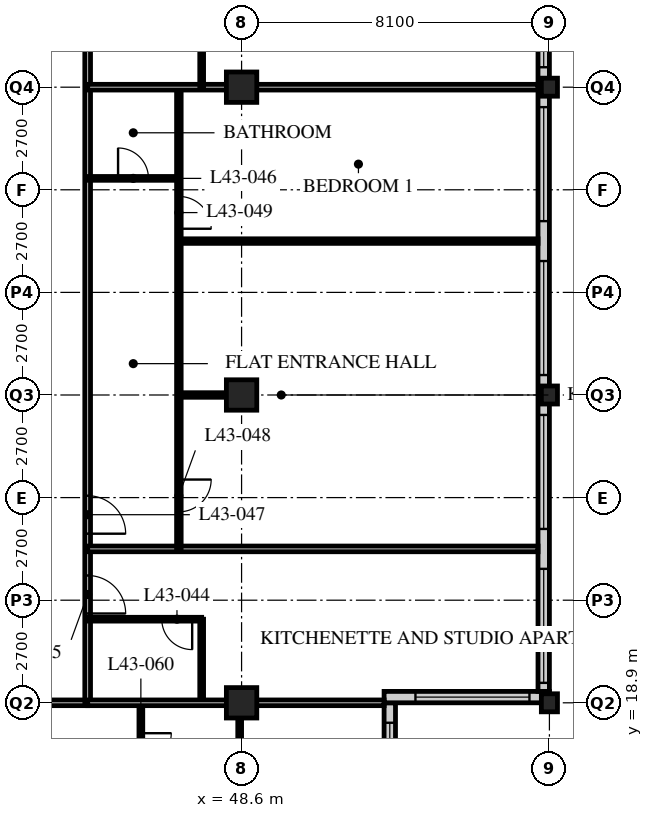
"""IFC4 building model, lengths in metres.
Left out: names, types, materials, properties, quantities, classifications, styles, units other than length and angle.
Written with IfcOpenShell. Run it as: python <this file> out.ifc"""

import sys

from ifc_helpers import new_model, si_unit, direction, frame, frame_2d, origin, origin_2d, place, context, subcontext, project, spatial, rectangle, hollow_rectangle, i_section, extrude, element, fill, save


model = new_model("IFC4")
c1 = context("Model", 3, precision=1e-05, world=origin(), true_north=direction((0.0, 1.0)))
c2 = subcontext(c1, "Body", "Model", "MODEL_VIEW")
j1 = project(units=[si_unit("LENGTHUNIT", "METRE"), si_unit("PLANEANGLEUNIT", "RADIAN")], contexts=[c1])
p1 = place(None, origin())
s1 = spatial("IfcSite", under=j1, at=p1, CompositionType="ELEMENT")
p2 = place(p1, origin())
s2 = spatial("IfcBuilding", under=s1, at=p2, CompositionType="ELEMENT")
p3 = place(p2, frame((0.0, 0.0, 170.4)))
s3 = spatial("IfcBuildingStorey", under=s2, at=p3, CompositionType="ELEMENT", Elevation=170.4)
for number, where, z_axis, x_axis in (
    (1, (48.6, 18.9, 0.0), (0.0, 0.0, 1.0), (1.0, 0.0, 0.0)),
    (2, (48.6, 27.0, 0.0), (0.0, 0.0, 1.0), (1.0, 0.0, 0.0)),
    (3, (48.6, 35.1, 0.0), (0.0, 0.0, 1.0), (1.0, 0.0, 0.0)),
):
    element("IfcColumn", number, at=place(p3, frame(where, z_axis=z_axis, x_axis=x_axis)), inside=s3, PredefinedType="COLUMN", context=c2, shape_type="SweptSolid", body=[
        extrude(hollow_rectangle(XDim=0.8, YDim=0.8, WallThickness=0.08, at=origin_2d()), origin(), (0.0, 0.0, 1.0), 3.6),
    ])
for number, where, z_axis, x_axis in (
    (4, (56.7, 18.9, 0.0), (0.0, 0.0, 1.0), (1.0, 0.0, 0.0)),
    (5, (56.7, 27.0, 0.0), (0.0, 0.0, 1.0), (1.0, 0.0, 0.0)),
    (6, (56.7, 35.1, 0.0), (0.0, 0.0, 1.0), (1.0, 0.0, 0.0)),
):
    element("IfcColumn", number, at=place(p3, frame(where, z_axis=z_axis, x_axis=x_axis)), inside=s3, PredefinedType="COLUMN", context=c2, shape_type="SweptSolid", body=[
        extrude(i_section(OverallWidth=0.424, OverallDepth=0.475, WebThickness=0.048, FlangeThickness=0.077, FilletRadius=0.015, at=origin_2d()), origin(), (0.0, 0.0, 1.0), 3.6),
    ])
p4 = place(p3, frame((52.5, 15.15, 0.0), z_axis=(0.0, 0.0, 1.0), x_axis=(0.0, 1.0, 0.0)))
e7 = element("IfcWall", 7, at=p4, inside=s3, PredefinedType="SOLIDWALL", context=c2, shape_type="SweptSolid", body=[
    extrude(rectangle(XDim=3.75, YDim=0.3, at=frame_2d((1.875, 0.0))), origin(), (0.0, 0.0, 1.0), 3.39),
])
p5 = place(p4, frame((0.225, 0.0, 0.6)))
e8 = element("IfcOpeningElement", 8, at=p5, cuts=e7, PredefinedType="OPENING", context=c2, shape_type="SweptSolid", body=[
    extrude(rectangle(XDim=3.0, YDim=2.0, at=frame_2d((1.5, 1.0))), frame((0.0, 0.16, 0.0), z_axis=(0.0, -1.0, 0.0), x_axis=(1.0, 0.0, 0.0)), (0.0, 0.0, 1.0), 0.32),
])
p6 = place(p3, frame((52.35, 19.05, 0.0), z_axis=(0.0, 0.0, 1.0), x_axis=(1.0, 0.0, 0.0)))
e9 = element("IfcWall", 9, at=p6, inside=s3, PredefinedType="SOLIDWALL", context=c2, shape_type="SweptSolid", body=[
    extrude(rectangle(XDim=4.35, YDim=0.3, at=frame_2d((2.175, 0.0))), origin(), (0.0, 0.0, 1.0), 3.39),
])
p7 = place(p6, frame((0.825, 0.0, 0.6)))
e10 = element("IfcOpeningElement", 10, at=p7, cuts=e9, PredefinedType="OPENING", context=c2, shape_type="SweptSolid", body=[
    extrude(rectangle(XDim=3.0, YDim=2.0, at=frame_2d((1.5, 1.0))), frame((0.0, 0.16, 0.0), z_axis=(0.0, -1.0, 0.0), x_axis=(1.0, 0.0, 0.0)), (0.0, 0.0, 1.0), 0.32),
])
p8 = place(p3, frame((56.55, 19.2, 0.0), z_axis=(0.0, 0.0, 1.0), x_axis=(0.0, 1.0, 0.0)))
e11 = element("IfcWall", 11, at=p8, inside=s3, PredefinedType="SOLIDWALL", context=c2, shape_type="SweptSolid", body=[
    extrude(rectangle(XDim=32.1, YDim=0.3, at=frame_2d((16.05, 0.0))), origin(), (0.0, 0.0, 1.0), 3.39),
])
p9 = place(p8, frame((0.225, 0.0, 0.6)))
e12 = element("IfcOpeningElement", 12, at=p9, cuts=e11, PredefinedType="OPENING", context=c2, shape_type="SweptSolid", body=[
    extrude(rectangle(XDim=3.0, YDim=2.4, at=frame_2d((1.5, 1.2))), frame((0.0, 0.16, 0.0), z_axis=(0.0, -1.0, 0.0), x_axis=(1.0, 0.0, 0.0)), (0.0, 0.0, 1.0), 0.32),
])
p10 = place(p8, frame((4.275, 0.0, 0.6)))
e13 = element("IfcOpeningElement", 13, at=p10, cuts=e11, PredefinedType="OPENING", context=c2, shape_type="SweptSolid", body=[
    extrude(rectangle(XDim=3.0, YDim=2.4, at=frame_2d((1.5, 1.2))), frame((0.0, 0.16, 0.0), z_axis=(0.0, -1.0, 0.0), x_axis=(1.0, 0.0, 0.0)), (0.0, 0.0, 1.0), 0.32),
])
p11 = place(p8, frame((8.325, 0.0, 0.6)))
e14 = element("IfcOpeningElement", 14, at=p11, cuts=e11, PredefinedType="OPENING", context=c2, shape_type="SweptSolid", body=[
    extrude(rectangle(XDim=3.0, YDim=2.4, at=frame_2d((1.5, 1.2))), frame((0.0, 0.16, 0.0), z_axis=(0.0, -1.0, 0.0), x_axis=(1.0, 0.0, 0.0)), (0.0, 0.0, 1.0), 0.32),
])
p12 = place(p8, frame((12.375, 0.0, 0.6)))
e15 = element("IfcOpeningElement", 15, at=p12, cuts=e11, PredefinedType="OPENING", context=c2, shape_type="SweptSolid", body=[
    extrude(rectangle(XDim=3.0, YDim=2.4, at=frame_2d((1.5, 1.2))), frame((0.0, 0.16, 0.0), z_axis=(0.0, -1.0, 0.0), x_axis=(1.0, 0.0, 0.0)), (0.0, 0.0, 1.0), 0.32),
])
p13 = place(p8, frame((16.425, 0.0, 0.6)))
e16 = element("IfcOpeningElement", 16, at=p13, cuts=e11, PredefinedType="OPENING", context=c2, shape_type="SweptSolid", body=[
    extrude(rectangle(XDim=3.0, YDim=2.4, at=frame_2d((1.5, 1.2))), frame((0.0, 0.16, 0.0), z_axis=(0.0, -1.0, 0.0), x_axis=(1.0, 0.0, 0.0)), (0.0, 0.0, 1.0), 0.32),
])
p14 = place(p8, frame((20.475, 0.0, 0.6)))
e17 = element("IfcOpeningElement", 17, at=p14, cuts=e11, PredefinedType="OPENING", context=c2, shape_type="SweptSolid", body=[
    extrude(rectangle(XDim=3.0, YDim=2.4, at=frame_2d((1.5, 1.2))), frame((0.0, 0.16, 0.0), z_axis=(0.0, -1.0, 0.0), x_axis=(1.0, 0.0, 0.0)), (0.0, 0.0, 1.0), 0.32),
])
p15 = place(p8, frame((24.525, 0.0, 0.6)))
e18 = element("IfcOpeningElement", 18, at=p15, cuts=e11, PredefinedType="OPENING", context=c2, shape_type="SweptSolid", body=[
    extrude(rectangle(XDim=3.0, YDim=2.4, at=frame_2d((1.5, 1.2))), frame((0.0, 0.16, 0.0), z_axis=(0.0, -1.0, 0.0), x_axis=(1.0, 0.0, 0.0)), (0.0, 0.0, 1.0), 0.32),
])
p16 = place(p8, frame((28.575, 0.0, 0.6)))
e19 = element("IfcOpeningElement", 19, at=p16, cuts=e11, PredefinedType="OPENING", context=c2, shape_type="SweptSolid", body=[
    extrude(rectangle(XDim=3.0, YDim=2.4, at=frame_2d((1.5, 1.2))), frame((0.0, 0.16, 0.0), z_axis=(0.0, -1.0, 0.0), x_axis=(1.0, 0.0, 0.0)), (0.0, 0.0, 1.0), 0.32),
])
p17 = place(p3, frame((12.15, 18.9, 0.0), z_axis=(0.0, 0.0, 1.0), x_axis=(1.0, 0.0, 0.0)))
e20 = element("IfcWall", 20, at=p17, inside=s3, PredefinedType="PARTITIONING", context=c2, shape_type="SweptSolid", body=[
    extrude(rectangle(XDim=32.4, YDim=0.15, at=frame_2d((16.2, 0.0))), origin(), (0.0, 0.0, 1.0), 2.778),
])
p18 = place(p17, frame((6.4, 0.0, 0.0)))
e21 = element("IfcOpeningElement", 21, at=p18, cuts=e20, PredefinedType="OPENING", context=c2, shape_type="SweptSolid", body=[
    extrude(rectangle(XDim=1.0, YDim=2.1, at=frame_2d((0.5, 1.05))), frame((0.0, 0.085, 0.0), z_axis=(0.0, -1.0, 0.0), x_axis=(1.0, 0.0, 0.0)), (0.0, 0.0, 1.0), 0.17),
])
p19 = place(p17, frame((8.8, 0.0, 0.0)))
e22 = element("IfcOpeningElement", 22, at=p19, cuts=e20, PredefinedType="OPENING", context=c2, shape_type="SweptSolid", body=[
    extrude(rectangle(XDim=1.0, YDim=2.1, at=frame_2d((0.5, 1.05))), frame((0.0, 0.085, 0.0), z_axis=(0.0, -1.0, 0.0), x_axis=(1.0, 0.0, 0.0)), (0.0, 0.0, 1.0), 0.17),
])
p20 = place(p17, frame((13.05, 0.0, 0.0)))
e23 = element("IfcOpeningElement", 23, at=p20, cuts=e20, PredefinedType="OPENING", context=c2, shape_type="SweptSolid", body=[
    extrude(rectangle(XDim=1.0, YDim=2.1, at=frame_2d((0.5, 1.05))), frame((0.0, 0.085, 0.0), z_axis=(0.0, -1.0, 0.0), x_axis=(1.0, 0.0, 0.0)), (0.0, 0.0, 1.0), 0.17),
])
p21 = place(p17, frame((22.6, 0.0, 0.0)))
e24 = element("IfcOpeningElement", 24, at=p21, cuts=e20, PredefinedType="OPENING", context=c2, shape_type="SweptSolid", body=[
    extrude(rectangle(XDim=1.0, YDim=2.1, at=frame_2d((0.5, 1.05))), frame((0.0, 0.085, 0.0), z_axis=(0.0, -1.0, 0.0), x_axis=(1.0, 0.0, 0.0)), (0.0, 0.0, 1.0), 0.17),
])
p22 = place(p17, frame((25.0, 0.0, 0.0)))
e25 = element("IfcOpeningElement", 25, at=p22, cuts=e20, PredefinedType="OPENING", context=c2, shape_type="SweptSolid", body=[
    extrude(rectangle(XDim=1.0, YDim=2.1, at=frame_2d((0.5, 1.05))), frame((0.0, 0.085, 0.0), z_axis=(0.0, -1.0, 0.0), x_axis=(1.0, 0.0, 0.0)), (0.0, 0.0, 1.0), 0.17),
])
p23 = place(p17, frame((1.525, 0.0, 0.0)))
e26 = element("IfcOpeningElement", 26, at=p23, cuts=e20, PredefinedType="OPENING", context=c2, shape_type="SweptSolid", body=[
    extrude(rectangle(XDim=1.0, YDim=2.1, at=frame_2d((0.5, 1.05))), frame((0.0, 0.085, 0.0), z_axis=(0.0, -1.0, 0.0), x_axis=(1.0, 0.0, 0.0)), (0.0, 0.0, 1.0), 0.17),
])
p24 = place(p17, frame((29.875, 0.0, 0.0)))
e27 = element("IfcOpeningElement", 27, at=p24, cuts=e20, PredefinedType="OPENING", context=c2, shape_type="SweptSolid", body=[
    extrude(rectangle(XDim=1.0, YDim=2.1, at=frame_2d((0.5, 1.05))), frame((0.0, 0.085, 0.0), z_axis=(0.0, -1.0, 0.0), x_axis=(1.0, 0.0, 0.0)), (0.0, 0.0, 1.0), 0.17),
])
p25 = place(p3, frame((44.55, 18.9, 0.0), z_axis=(0.0, 0.0, 1.0), x_axis=(0.0, 1.0, 0.0)))
e28 = element("IfcWall", 28, at=p25, inside=s3, PredefinedType="PARTITIONING", context=c2, shape_type="SweptSolid", body=[
    extrude(rectangle(XDim=24.3, YDim=0.15, at=frame_2d((12.15, 0.0))), origin(), (0.0, 0.0, 1.0), 3.39),
])
p26 = place(p25, frame((2.35, 0.0, 0.0)))
e29 = element("IfcOpeningElement", 29, at=p26, cuts=e28, PredefinedType="OPENING", context=c2, shape_type="SweptSolid", body=[
    extrude(rectangle(XDim=1.0, YDim=2.1, at=frame_2d((0.5, 1.05))), frame((0.0, 0.085, 0.0), z_axis=(0.0, -1.0, 0.0), x_axis=(1.0, 0.0, 0.0)), (0.0, 0.0, 1.0), 0.17),
])
p27 = place(p25, frame((4.45, 0.0, 0.0)))
e30 = element("IfcOpeningElement", 30, at=p27, cuts=e28, PredefinedType="OPENING", context=c2, shape_type="SweptSolid", body=[
    extrude(rectangle(XDim=1.0, YDim=2.1, at=frame_2d((0.5, 1.05))), frame((0.0, 0.085, 0.0), z_axis=(0.0, -1.0, 0.0), x_axis=(1.0, 0.0, 0.0)), (0.0, 0.0, 1.0), 0.17),
])
p28 = place(p25, frame((18.55, 0.0, 0.0)))
e31 = element("IfcOpeningElement", 31, at=p28, cuts=e28, PredefinedType="OPENING", context=c2, shape_type="SweptSolid", body=[
    extrude(rectangle(XDim=1.0, YDim=2.1, at=frame_2d((0.5, 1.05))), frame((0.0, 0.085, 0.0), z_axis=(0.0, -1.0, 0.0), x_axis=(1.0, 0.0, 0.0)), (0.0, 0.0, 1.0), 0.17),
])
p29 = place(p25, frame((22.6, 0.0, 0.0)))
e32 = element("IfcOpeningElement", 32, at=p29, cuts=e28, PredefinedType="OPENING", context=c2, shape_type="SweptSolid", body=[
    extrude(rectangle(XDim=1.0, YDim=2.1, at=frame_2d((0.5, 1.05))), frame((0.0, 0.085, 0.0), z_axis=(0.0, -1.0, 0.0), x_axis=(1.0, 0.0, 0.0)), (0.0, 0.0, 1.0), 0.17),
])
p30 = place(p3, frame((47.55, 18.9, 0.0), z_axis=(0.0, 0.0, 1.0), x_axis=(0.0, 1.0, 0.0)))
e33 = element("IfcWall", 33, at=p30, inside=s3, PredefinedType="PARTITIONING", context=c2, shape_type="SweptSolid", body=[
    extrude(rectangle(XDim=2.2, YDim=0.1, at=frame_2d((1.1, 0.0))), origin(), (0.0, 0.0, 1.0), 3.39),
])
p31 = place(p3, frame((44.55, 21.1, 0.0), z_axis=(0.0, 0.0, 1.0), x_axis=(1.0, 0.0, 0.0)))
e34 = element("IfcWall", 34, at=p31, inside=s3, PredefinedType="PARTITIONING", context=c2, shape_type="SweptSolid", body=[
    extrude(rectangle(XDim=3.0, YDim=0.1, at=frame_2d((1.5, 0.0))), origin(), (0.0, 0.0, 1.0), 3.39),
])
p32 = place(p31, frame((1.95, 0.0, 0.0)))
e35 = element("IfcOpeningElement", 35, at=p32, cuts=e34, PredefinedType="OPENING", context=c2, shape_type="SweptSolid", body=[
    extrude(rectangle(XDim=0.8, YDim=2.1, at=frame_2d((0.4, 1.05))), frame((0.0, 0.06, 0.0), z_axis=(0.0, -1.0, 0.0), x_axis=(1.0, 0.0, 0.0)), (0.0, 0.0, 1.0), 0.12),
])
p33 = place(p3, frame((44.55, 22.95, 0.0), z_axis=(0.0, 0.0, 1.0), x_axis=(1.0, 0.0, 0.0)))
e36 = element("IfcWall", 36, at=p33, inside=s3, PredefinedType="PARTITIONING", context=c2, shape_type="SweptSolid", body=[
    extrude(rectangle(XDim=11.85, YDim=0.15, at=frame_2d((5.925, 0.0))), origin(), (0.0, 0.0, 1.0), 3.39),
])
p34 = place(p3, frame((46.95, 22.95, 0.0), z_axis=(0.0, 0.0, 1.0), x_axis=(0.0, 1.0, 0.0)))
e37 = element("IfcWall", 37, at=p34, inside=s3, PredefinedType="PARTITIONING", context=c2, shape_type="SweptSolid", body=[
    extrude(rectangle(XDim=12.15, YDim=0.12, at=frame_2d((6.075, 0.0))), origin(), (0.0, 0.0, 1.0), 3.39),
])
p35 = place(p34, frame((0.975, 0.0, 0.0)))
e38 = element("IfcOpeningElement", 38, at=p35, cuts=e37, PredefinedType="OPENING", context=c2, shape_type="SweptSolid", body=[
    extrude(rectangle(XDim=0.85, YDim=2.1, at=frame_2d((0.425, 1.05))), frame((0.0, 0.07, 0.0), z_axis=(0.0, -1.0, 0.0), x_axis=(1.0, 0.0, 0.0)), (0.0, 0.0, 1.0), 0.14),
])
p36 = place(p34, frame((8.425, 0.0, 0.0)))
e39 = element("IfcOpeningElement", 39, at=p36, cuts=e37, PredefinedType="OPENING", context=c2, shape_type="SweptSolid", body=[
    extrude(rectangle(XDim=0.85, YDim=2.1, at=frame_2d((0.425, 1.05))), frame((0.0, 0.07, 0.0), z_axis=(0.0, -1.0, 0.0), x_axis=(1.0, 0.0, 0.0)), (0.0, 0.0, 1.0), 0.14),
])
p37 = place(p3, frame((44.55, 32.7, 0.0), z_axis=(0.0, 0.0, 1.0), x_axis=(1.0, 0.0, 0.0)))
e40 = element("IfcWall", 40, at=p37, inside=s3, PredefinedType="PARTITIONING", context=c2, shape_type="SweptSolid", body=[
    extrude(rectangle(XDim=2.4, YDim=0.1, at=frame_2d((1.2, 0.0))), origin(), (0.0, 0.0, 1.0), 3.39),
])
p38 = place(p37, frame((0.8, 0.0, 0.0)))
e41 = element("IfcOpeningElement", 41, at=p38, cuts=e40, PredefinedType="OPENING", context=c2, shape_type="SweptSolid", body=[
    extrude(rectangle(XDim=0.8, YDim=2.1, at=frame_2d((0.4, 1.05))), frame((0.0, 0.06, 0.0), z_axis=(0.0, -1.0, 0.0), x_axis=(1.0, 0.0, 0.0)), (0.0, 0.0, 1.0), 0.12),
])
p39 = place(p3, frame((46.95, 31.05, 0.0), z_axis=(0.0, 0.0, 1.0), x_axis=(1.0, 0.0, 0.0)))
e42 = element("IfcWall", 42, at=p39, inside=s3, PredefinedType="PARTITIONING", context=c2, shape_type="SweptSolid", body=[
    extrude(rectangle(XDim=9.45, YDim=0.12, at=frame_2d((4.725, 0.0))), origin(), (0.0, 0.0, 1.0), 3.39),
])
p40 = place(p3, frame((44.55, 35.1, 0.0), z_axis=(0.0, 0.0, 1.0), x_axis=(1.0, 0.0, 0.0)))
e43 = element("IfcWall", 43, at=p40, inside=s3, PredefinedType="PARTITIONING", context=c2, shape_type="SweptSolid", body=[
    extrude(rectangle(XDim=11.85, YDim=0.15, at=frame_2d((5.925, 0.0))), origin(), (0.0, 0.0, 1.0), 2.778),
])
p41 = place(p3, frame((47.55, 35.1, 0.0), z_axis=(0.0, 0.0, 1.0), x_axis=(0.0, 1.0, 0.0)))
e44 = element("IfcWall", 44, at=p41, inside=s3, PredefinedType="PARTITIONING", context=c2, shape_type="SweptSolid", body=[
    extrude(rectangle(XDim=2.2, YDim=0.1, at=frame_2d((1.1, 0.0))), origin(), (0.0, 0.0, 1.0), 3.39),
])
p42 = place(p3, frame((45.95, 18.9, 0.0), z_axis=(0.0, 0.0, 1.0), x_axis=(0.0, -1.0, 0.0)))
e45 = element("IfcWall", 45, at=p42, inside=s3, PredefinedType="PARTITIONING", context=c2, shape_type="SweptSolid", body=[
    extrude(rectangle(XDim=2.4, YDim=0.1, at=frame_2d((1.2, 0.0))), origin(), (0.0, 0.0, 1.0), 3.39),
])
p43 = place(p42, frame((0.8, 0.0, 0.0)))
e46 = element("IfcOpeningElement", 46, at=p43, cuts=e45, PredefinedType="OPENING", context=c2, shape_type="SweptSolid", body=[
    extrude(rectangle(XDim=0.8, YDim=2.1, at=frame_2d((0.4, 1.05))), frame((0.0, 0.06, 0.0), z_axis=(0.0, -1.0, 0.0), x_axis=(1.0, 0.0, 0.0)), (0.0, 0.0, 1.0), 0.12),
])
p44 = place(p3, frame((48.55, 18.9, 0.0), z_axis=(0.0, 0.0, 1.0), x_axis=(0.0, -1.0, 0.0)))
e47 = element("IfcWall", 47, at=p44, inside=s3, PredefinedType="PARTITIONING", context=c2, shape_type="SweptSolid", body=[
    extrude(rectangle(XDim=2.4, YDim=0.1, at=frame_2d((1.2, 0.0))), origin(), (0.0, 0.0, 1.0), 2.778),
])
p45 = place(p3, frame((44.55, 18.9, 0.0), z_axis=(0.0, 0.0, 1.0), x_axis=(1.0, 0.0, 0.0)))
e48 = element("IfcWall", 48, at=p45, inside=s3, PredefinedType="PARTITIONING", context=c2, shape_type="SweptSolid", body=[
    extrude(rectangle(XDim=7.8, YDim=0.15, at=frame_2d((3.9, 0.0))), origin(), (0.0, 0.0, 1.0), 2.778),
])
p46 = place(p3, frame((46.95, 27.0, 0.0), z_axis=(0.0, 0.0, 1.0), x_axis=(1.0, 0.0, 0.0)))
e49 = element("IfcWall", 49, at=p46, inside=s3, PredefinedType="PARTITIONING", context=c2, shape_type="SweptSolid", body=[
    extrude(rectangle(XDim=1.25, YDim=0.12, at=frame_2d((0.625, 0.0))), origin(), (0.0, 0.0, 1.0), 2.778),
])
p47 = place(p5, origin())
e50 = element("IfcWindow", 50, at=p47, inside=s3, PartitioningType="SINGLE_PANEL", PredefinedType="WINDOW", context=c2, shape_type="SweptSolid", body=[
    extrude(rectangle(XDim=3.0, YDim=2.0, at=frame_2d((1.5, 1.0))), frame((0.0, 0.03, 0.0), z_axis=(0.0, -1.0, 0.0), x_axis=(1.0, 0.0, 0.0)), (0.0, 0.0, 1.0), 0.06),
])
fill(e8, e50)
p48 = place(p7, origin())
e51 = element("IfcWindow", 51, at=p48, inside=s3, PartitioningType="SINGLE_PANEL", PredefinedType="WINDOW", context=c2, shape_type="SweptSolid", body=[
    extrude(rectangle(XDim=3.0, YDim=2.0, at=frame_2d((1.5, 1.0))), frame((0.0, 0.03, 0.0), z_axis=(0.0, -1.0, 0.0), x_axis=(1.0, 0.0, 0.0)), (0.0, 0.0, 1.0), 0.06),
])
fill(e10, e51)
p49 = place(p9, origin())
e52 = element("IfcWindow", 52, at=p49, inside=s3, PartitioningType="SINGLE_PANEL", PredefinedType="WINDOW", context=c2, shape_type="SweptSolid", body=[
    extrude(rectangle(XDim=3.0, YDim=2.4, at=frame_2d((1.5, 1.2))), frame((0.0, 0.03, 0.0), z_axis=(0.0, -1.0, 0.0), x_axis=(1.0, 0.0, 0.0)), (0.0, 0.0, 1.0), 0.06),
])
fill(e12, e52)
p50 = place(p10, origin())
e53 = element("IfcWindow", 53, at=p50, inside=s3, PartitioningType="SINGLE_PANEL", PredefinedType="WINDOW", context=c2, shape_type="SweptSolid", body=[
    extrude(rectangle(XDim=3.0, YDim=2.4, at=frame_2d((1.5, 1.2))), frame((0.0, 0.03, 0.0), z_axis=(0.0, -1.0, 0.0), x_axis=(1.0, 0.0, 0.0)), (0.0, 0.0, 1.0), 0.06),
])
fill(e13, e53)
p51 = place(p11, origin())
e54 = element("IfcWindow", 54, at=p51, inside=s3, PartitioningType="SINGLE_PANEL", PredefinedType="WINDOW", context=c2, shape_type="SweptSolid", body=[
    extrude(rectangle(XDim=3.0, YDim=2.4, at=frame_2d((1.5, 1.2))), frame((0.0, 0.03, 0.0), z_axis=(0.0, -1.0, 0.0), x_axis=(1.0, 0.0, 0.0)), (0.0, 0.0, 1.0), 0.06),
])
fill(e14, e54)
p52 = place(p12, origin())
e55 = element("IfcWindow", 55, at=p52, inside=s3, PartitioningType="SINGLE_PANEL", PredefinedType="WINDOW", context=c2, shape_type="SweptSolid", body=[
    extrude(rectangle(XDim=3.0, YDim=2.4, at=frame_2d((1.5, 1.2))), frame((0.0, 0.03, 0.0), z_axis=(0.0, -1.0, 0.0), x_axis=(1.0, 0.0, 0.0)), (0.0, 0.0, 1.0), 0.06),
])
fill(e15, e55)
p53 = place(p13, origin())
e56 = element("IfcWindow", 56, at=p53, inside=s3, PartitioningType="SINGLE_PANEL", PredefinedType="WINDOW", context=c2, shape_type="SweptSolid", body=[
    extrude(rectangle(XDim=3.0, YDim=2.4, at=frame_2d((1.5, 1.2))), frame((0.0, 0.03, 0.0), z_axis=(0.0, -1.0, 0.0), x_axis=(1.0, 0.0, 0.0)), (0.0, 0.0, 1.0), 0.06),
])
fill(e16, e56)
p54 = place(p32, origin())
e57 = element("IfcDoor", 57, at=p54, inside=s3, OperationType="SINGLE_SWING_LEFT", PredefinedType="DOOR", context=c2, shape_type="SweptSolid", body=[
    extrude(rectangle(XDim=0.8, YDim=2.1, at=frame_2d((0.4, 1.05))), frame((0.0, 0.025, 0.0), z_axis=(0.0, -1.0, 0.0), x_axis=(1.0, 0.0, 0.0)), (0.0, 0.0, 1.0), 0.05),
])
fill(e35, e57)
p55 = place(p26, origin())
e58 = element("IfcDoor", 58, at=p55, inside=s3, OperationType="SINGLE_SWING_RIGHT", PredefinedType="DOOR", context=c2, shape_type="SweptSolid", body=[
    extrude(rectangle(XDim=1.0, YDim=2.1, at=frame_2d((0.5, 1.05))), frame((0.0, 0.025, 0.0), z_axis=(0.0, -1.0, 0.0), x_axis=(1.0, 0.0, 0.0)), (0.0, 0.0, 1.0), 0.05),
])
fill(e29, e58)
p56 = place(p38, origin())
e59 = element("IfcDoor", 59, at=p56, inside=s3, OperationType="SINGLE_SWING_LEFT", PredefinedType="DOOR", context=c2, shape_type="SweptSolid", body=[
    extrude(rectangle(XDim=0.8, YDim=2.1, at=frame_2d((0.4, 1.05))), frame((0.0, 0.025, 0.0), z_axis=(0.0, -1.0, 0.0), x_axis=(1.0, 0.0, 0.0)), (0.0, 0.0, 1.0), 0.05),
])
fill(e41, e59)
p57 = place(p27, origin())
e60 = element("IfcDoor", 60, at=p57, inside=s3, OperationType="SINGLE_SWING_RIGHT", PredefinedType="DOOR", context=c2, shape_type="SweptSolid", body=[
    extrude(rectangle(XDim=1.0, YDim=2.1, at=frame_2d((0.5, 1.05))), frame((0.0, 0.025, 0.0), z_axis=(0.0, -1.0, 0.0), x_axis=(1.0, 0.0, 0.0)), (0.0, 0.0, 1.0), 0.05),
])
fill(e30, e60)
p58 = place(p35, origin())
e61 = element("IfcDoor", 61, at=p58, inside=s3, OperationType="SINGLE_SWING_LEFT", PredefinedType="DOOR", context=c2, shape_type="SweptSolid", body=[
    extrude(rectangle(XDim=0.85, YDim=2.1, at=frame_2d((0.425, 1.05))), frame((0.0, 0.025, 0.0), z_axis=(0.0, -1.0, 0.0), x_axis=(1.0, 0.0, 0.0)), (0.0, 0.0, 1.0), 0.05),
])
fill(e38, e61)
p59 = place(p36, origin())
e62 = element("IfcDoor", 62, at=p59, inside=s3, OperationType="SINGLE_SWING_RIGHT", PredefinedType="DOOR", context=c2, shape_type="SweptSolid", body=[
    extrude(rectangle(XDim=0.85, YDim=2.1, at=frame_2d((0.425, 1.05))), frame((0.0, 0.025, 0.0), z_axis=(0.0, -1.0, 0.0), x_axis=(1.0, 0.0, 0.0)), (0.0, 0.0, 1.0), 0.05),
])
fill(e39, e62)
p60 = place(p43, origin())
e63 = element("IfcDoor", 63, at=p60, inside=s3, OperationType="SINGLE_SWING_LEFT", PredefinedType="DOOR", context=c2, shape_type="SweptSolid", body=[
    extrude(rectangle(XDim=0.8, YDim=2.1, at=frame_2d((0.4, 1.05))), frame((0.0, 0.025, 0.0), z_axis=(0.0, -1.0, 0.0), x_axis=(1.0, 0.0, 0.0)), (0.0, 0.0, 1.0), 0.05),
])
fill(e46, e63)
save(model, sys.argv[1])
